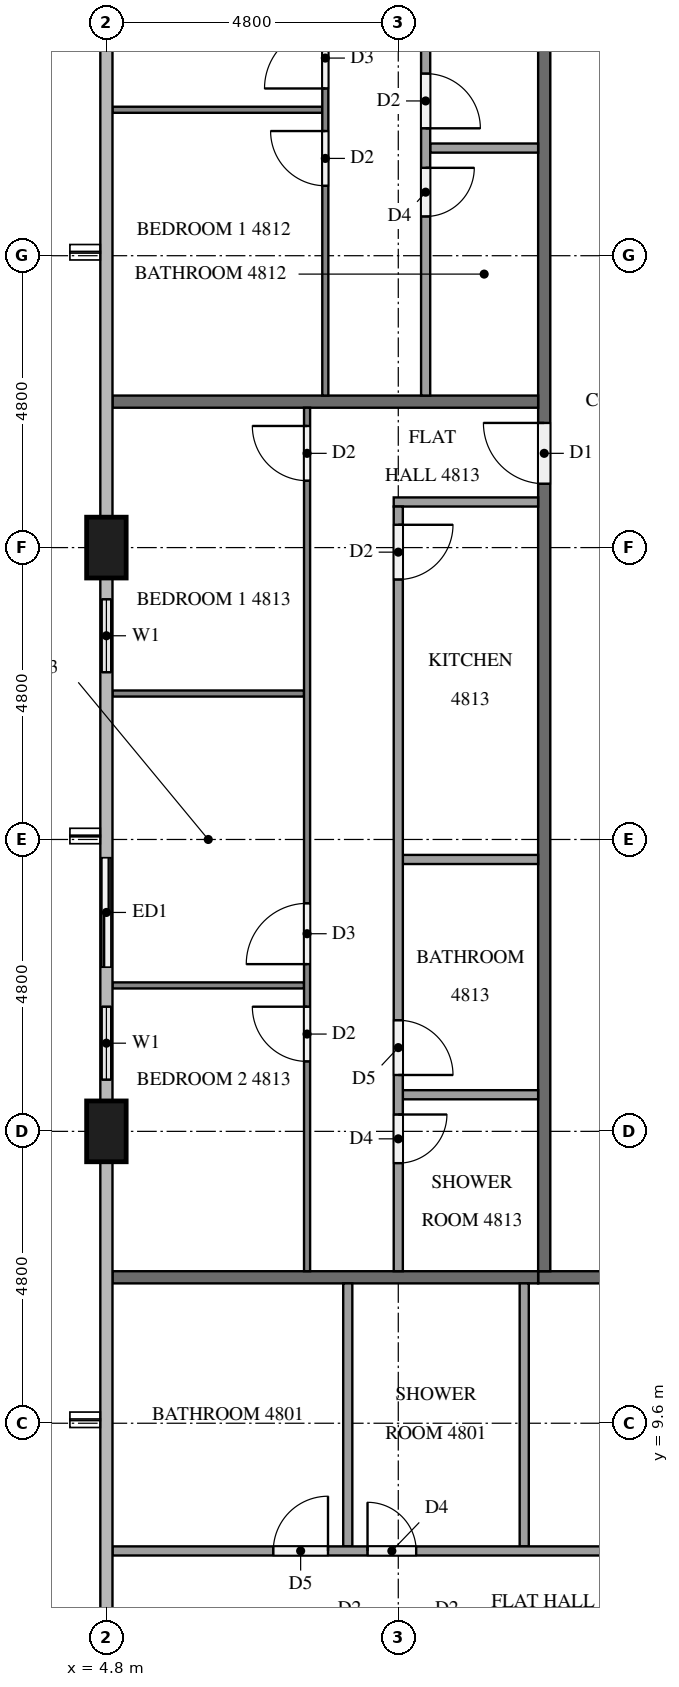
"""IFC4 building model, lengths in metres.
Left out: names, types, materials, properties, quantities, classifications, styles, units other than length and angle.
Written with IfcOpenShell. Run it as: python <this file> out.ifc"""

import sys

from ifc_helpers import new_model, si_unit, direction, frame, frame_2d, origin, origin_2d, place, context, subcontext, project, spatial, rectangle, extrude, element, fill, save


model = new_model("IFC4")
c1 = context("Model", 3, precision=1e-05, world=origin(), true_north=direction((0.0, 1.0)))
c2 = subcontext(c1, "Body", "Model", "MODEL_VIEW")
j1 = project(units=[si_unit("LENGTHUNIT", "METRE"), si_unit("PLANEANGLEUNIT", "RADIAN")], contexts=[c1])
p1 = place(None, origin())
s1 = spatial("IfcSite", under=j1, at=p1, CompositionType="ELEMENT")
p2 = place(p1, origin())
s2 = spatial("IfcBuilding", under=s1, at=p2, CompositionType="ELEMENT")
p3 = place(p2, frame((0.0, 0.0, 185.9)))
s3 = spatial("IfcBuildingStorey", under=s2, at=p3, CompositionType="ELEMENT", Elevation=185.9)
for number, where, z_axis, x_axis in (
    (1, (4.8, 24.0, 0.0), (0.0, 0.0, 1.0), (0.0, 1.0, 0.0)),
    (2, (4.8, 14.4, 0.0), (0.0, 0.0, 1.0), (0.0, 1.0, 0.0)),
):
    element("IfcColumn", number, at=place(p3, frame(where, z_axis=z_axis, x_axis=x_axis)), inside=s3, PredefinedType="COLUMN", context=c2, shape_type="SweptSolid", body=[
        extrude(rectangle(XDim=1.0, YDim=0.65, at=origin_2d()), origin(), (0.0, 0.0, 1.0), 3.2),
    ])
p4 = place(p3, frame((4.8, 23.5, 0.0), z_axis=(0.0, 0.0, 1.0), x_axis=(0.0, -1.0, 0.0)))
e3 = element("IfcWall", 3, at=p4, inside=s3, PredefinedType="SOLIDWALL", context=c2, shape_type="SweptSolid", body=[
    extrude(rectangle(XDim=1.9, YDim=0.15, at=frame_2d((0.95, 0.0))), origin(), (0.0, 0.0, 1.0), 3.2),
])
p5 = place(p4, frame((0.35, 0.0, 0.9)))
e4 = element("IfcOpeningElement", 4, at=p5, cuts=e3, PredefinedType="OPENING", context=c2, shape_type="SweptSolid", body=[
    extrude(rectangle(XDim=1.2, YDim=1.4, at=frame_2d((0.6, 0.7))), frame((0.0, 0.085, 0.0), z_axis=(0.0, -1.0, 0.0), x_axis=(1.0, 0.0, 0.0)), (0.0, 0.0, 1.0), 0.17),
])
p6 = place(p3, frame((4.8, 19.2, 0.0), z_axis=(0.0, 0.0, 1.0), x_axis=(0.0, -1.0, 0.0)))
e5 = element("IfcWall", 5, at=p6, inside=s3, PredefinedType="SOLIDWALL", context=c2, shape_type="SweptSolid", body=[
    extrude(rectangle(XDim=4.3, YDim=0.15, at=frame_2d((2.15, 0.0))), origin(), (0.0, 0.0, 1.0), 3.2),
])
p7 = place(p6, frame((0.3, 0.0, 0.0)))
e6 = element("IfcOpeningElement", 6, at=p7, cuts=e5, PredefinedType="OPENING", context=c2, shape_type="SweptSolid", body=[
    extrude(rectangle(XDim=1.8, YDim=2.4, at=frame_2d((0.9, 1.2))), frame((0.0, 0.085, 0.0), z_axis=(0.0, -1.0, 0.0), x_axis=(1.0, 0.0, 0.0)), (0.0, 0.0, 1.0), 0.17),
])
p8 = place(p6, frame((2.75, 0.0, 0.9)))
e7 = element("IfcOpeningElement", 7, at=p8, cuts=e5, PredefinedType="OPENING", context=c2, shape_type="SweptSolid", body=[
    extrude(rectangle(XDim=1.2, YDim=1.4, at=frame_2d((0.6, 0.7))), frame((0.0, 0.085, 0.0), z_axis=(0.0, -1.0, 0.0), x_axis=(1.0, 0.0, 0.0)), (0.0, 0.0, 1.0), 0.17),
])
p9 = place(p3, frame((50.5, 12.0, 0.0), z_axis=(0.0, 0.0, 1.0), x_axis=(-1.0, 0.0, 0.0)))
e8 = element("IfcWall", 8, at=p9, inside=s3, PredefinedType="PARTITIONING", context=c2, shape_type="SweptSolid", body=[
    extrude(rectangle(XDim=38.6, YDim=0.2, at=frame_2d((19.3, 0.0))), origin(), (0.0, 0.0, 1.0), 3.2),
])
p10 = place(p9, frame((31.65, 0.0, 0.0)))
e9 = element("IfcOpeningElement", 9, at=p10, cuts=e8, PredefinedType="OPENING", context=c2, shape_type="SweptSolid", body=[
    extrude(rectangle(XDim=1.0, YDim=2.1, at=frame_2d((0.5, 1.05))), frame((0.0, 0.11, 0.0), z_axis=(0.0, -1.0, 0.0), x_axis=(1.0, 0.0, 0.0)), (0.0, 0.0, 1.0), 0.22),
])
p11 = place(p9, frame((17.25, 0.0, 0.0)))
e10 = element("IfcOpeningElement", 10, at=p11, cuts=e8, PredefinedType="OPENING", context=c2, shape_type="SweptSolid", body=[
    extrude(rectangle(XDim=1.0, YDim=2.1, at=frame_2d((0.5, 1.05))), frame((0.0, 0.11, 0.0), z_axis=(0.0, -1.0, 0.0), x_axis=(1.0, 0.0, 0.0)), (0.0, 0.0, 1.0), 0.22),
])
p12 = place(p9, frame((7.65, 0.0, 0.0)))
e11 = element("IfcOpeningElement", 11, at=p12, cuts=e8, PredefinedType="OPENING", context=c2, shape_type="SweptSolid", body=[
    extrude(rectangle(XDim=1.0, YDim=2.1, at=frame_2d((0.5, 1.05))), frame((0.0, 0.11, 0.0), z_axis=(0.0, -1.0, 0.0), x_axis=(1.0, 0.0, 0.0)), (0.0, 0.0, 1.0), 0.22),
])
p13 = place(p9, frame((5.9, 0.0, 0.0)))
e12 = element("IfcOpeningElement", 12, at=p13, cuts=e8, PredefinedType="OPENING", context=c2, shape_type="SweptSolid", body=[
    extrude(rectangle(XDim=1.1, YDim=2.1, at=frame_2d((0.55, 1.05))), frame((0.0, 0.11, 0.0), z_axis=(0.0, -1.0, 0.0), x_axis=(1.0, 0.0, 0.0)), (0.0, 0.0, 1.0), 0.22),
])
p14 = place(p3, frame((12.0, 12.1, 0.0), z_axis=(0.0, 0.0, 1.0), x_axis=(0.0, 1.0, 0.0)))
e13 = element("IfcWall", 13, at=p14, inside=s3, PredefinedType="PARTITIONING", context=c2, shape_type="SweptSolid", body=[
    extrude(rectangle(XDim=28.6, YDim=0.2, at=frame_2d((14.3, 0.0))), origin(), (0.0, 0.0, 1.0), 3.2),
])
p15 = place(p14, frame((26.65, 0.0, 0.0)))
e14 = element("IfcOpeningElement", 14, at=p15, cuts=e13, PredefinedType="OPENING", context=c2, shape_type="SweptSolid", body=[
    extrude(rectangle(XDim=1.0, YDim=2.1, at=frame_2d((0.5, 1.05))), frame((0.0, 0.11, 0.0), z_axis=(0.0, -1.0, 0.0), x_axis=(1.0, 0.0, 0.0)), (0.0, 0.0, 1.0), 0.22),
])
p16 = place(p14, frame((24.95, 0.0, 0.0)))
e15 = element("IfcOpeningElement", 15, at=p16, cuts=e13, PredefinedType="OPENING", context=c2, shape_type="SweptSolid", body=[
    extrude(rectangle(XDim=1.0, YDim=2.1, at=frame_2d((0.5, 1.05))), frame((0.0, 0.11, 0.0), z_axis=(0.0, -1.0, 0.0), x_axis=(1.0, 0.0, 0.0)), (0.0, 0.0, 1.0), 0.22),
])
p17 = place(p14, frame((12.95, 0.0, 0.0)))
e16 = element("IfcOpeningElement", 16, at=p17, cuts=e13, PredefinedType="OPENING", context=c2, shape_type="SweptSolid", body=[
    extrude(rectangle(XDim=1.0, YDim=2.1, at=frame_2d((0.5, 1.05))), frame((0.0, 0.11, 0.0), z_axis=(0.0, -1.0, 0.0), x_axis=(1.0, 0.0, 0.0)), (0.0, 0.0, 1.0), 0.22),
])
for number, where, z_axis, x_axis in (
    (17, (4.9, 12.0, 0.0), (0.0, 0.0, 1.0), (1.0, 0.0, 0.0)),
    (18, (4.9, 26.4, 0.0), (0.0, 0.0, 1.0), (1.0, 0.0, 0.0)),
):
    element("IfcWall", number, at=place(p3, frame(where, z_axis=z_axis, x_axis=x_axis)), inside=s3, PredefinedType="PARTITIONING", context=c2, shape_type="SweptSolid", body=[
        extrude(rectangle(XDim=7.0, YDim=0.2, at=frame_2d((3.5, 0.0))), origin(), (0.0, 0.0, 1.0), 3.2),
    ])
for number, where, z_axis, x_axis in (
    (19, (11.671, 11.9, 0.0), (0.0, 0.0, 1.0), (0.0, -1.0, 0.0)),
    (20, (8.769, 11.9, 0.0), (0.0, 0.0, 1.0), (0.0, -1.0, 0.0)),
):
    element("IfcWall", number, at=place(p3, frame(where, z_axis=z_axis, x_axis=x_axis)), inside=s3, PredefinedType="PARTITIONING", context=c2, shape_type="SweptSolid", body=[
        extrude(rectangle(XDim=4.325, YDim=0.15, at=frame_2d((2.163, 0.0))), origin(), (0.0, 0.0, 1.0), 3.2),
    ])
p18 = place(p3, frame((4.9, 7.5, 0.0), z_axis=(0.0, 0.0, 1.0), x_axis=(1.0, 0.0, 0.0)))
e21 = element("IfcWall", 21, at=p18, inside=s3, PredefinedType="PARTITIONING", context=c2, shape_type="SweptSolid", body=[
    extrude(rectangle(XDim=12.575, YDim=0.15, at=frame_2d((6.288, 0.0))), origin(), (0.0, 0.0, 1.0), 3.2),
])
p19 = place(p18, frame((11.375, 0.0, 0.0)))
e22 = element("IfcOpeningElement", 22, at=p19, cuts=e21, PredefinedType="OPENING", context=c2, shape_type="SweptSolid", body=[
    extrude(rectangle(XDim=0.9, YDim=2.1, at=frame_2d((0.45, 1.05))), frame((0.0, 0.085, 0.0), z_axis=(0.0, -1.0, 0.0), x_axis=(1.0, 0.0, 0.0)), (0.0, 0.0, 1.0), 0.17),
])
p20 = place(p18, frame((4.194, 0.0, 0.0)))
e23 = element("IfcOpeningElement", 23, at=p20, cuts=e21, PredefinedType="OPENING", context=c2, shape_type="SweptSolid", body=[
    extrude(rectangle(XDim=0.8, YDim=2.1, at=frame_2d((0.4, 1.05))), frame((0.0, 0.085, 0.0), z_axis=(0.0, -1.0, 0.0), x_axis=(1.0, 0.0, 0.0)), (0.0, 0.0, 1.0), 0.17),
])
p21 = place(p18, frame((2.644, 0.0, 0.0)))
e24 = element("IfcOpeningElement", 24, at=p21, cuts=e21, PredefinedType="OPENING", context=c2, shape_type="SweptSolid", body=[
    extrude(rectangle(XDim=0.9, YDim=2.1, at=frame_2d((0.45, 1.05))), frame((0.0, 0.085, 0.0), z_axis=(0.0, -1.0, 0.0), x_axis=(1.0, 0.0, 0.0)), (0.0, 0.0, 1.0), 0.17),
])
p22 = place(p3, frame((8.35, 31.2, 0.0), z_axis=(0.0, 0.0, 1.0), x_axis=(-1.0, 0.0, 0.0)))
e25 = element("IfcWall", 25, at=p22, inside=s3, PredefinedType="PARTITIONING", context=c2, shape_type="SweptSolid", body=[
    extrude(rectangle(XDim=3.45, YDim=0.1, at=frame_2d((1.725, 0.0))), origin(), (0.0, 0.0, 1.0), 3.2),
])
p23 = place(p3, frame((8.4, 26.5, 0.0), z_axis=(0.0, 0.0, 1.0), x_axis=(0.0, 1.0, 0.0)))
e26 = element("IfcWall", 26, at=p23, inside=s3, PredefinedType="PARTITIONING", context=c2, shape_type="SweptSolid", body=[
    extrude(rectangle(XDim=11.8, YDim=0.1, at=frame_2d((5.9, 0.0))), origin(), (0.0, 0.0, 1.0), 3.2),
])
p24 = place(p23, frame((5.05, 0.0, 0.0)))
e27 = element("IfcOpeningElement", 27, at=p24, cuts=e26, PredefinedType="OPENING", context=c2, shape_type="SweptSolid", body=[
    extrude(rectangle(XDim=1.0, YDim=2.1, at=frame_2d((0.5, 1.05))), frame((0.0, 0.06, 0.0), z_axis=(0.0, -1.0, 0.0), x_axis=(1.0, 0.0, 0.0)), (0.0, 0.0, 1.0), 0.12),
])
p25 = place(p23, frame((3.45, 0.0, 0.0)))
e28 = element("IfcOpeningElement", 28, at=p25, cuts=e26, PredefinedType="OPENING", context=c2, shape_type="SweptSolid", body=[
    extrude(rectangle(XDim=0.9, YDim=2.1, at=frame_2d((0.45, 1.05))), frame((0.0, 0.06, 0.0), z_axis=(0.0, -1.0, 0.0), x_axis=(1.0, 0.0, 0.0)), (0.0, 0.0, 1.0), 0.12),
])
p26 = place(p3, frame((11.9, 30.57, 0.0), z_axis=(0.0, 0.0, 1.0), x_axis=(-1.0, 0.0, 0.0)))
e29 = element("IfcWall", 29, at=p26, inside=s3, PredefinedType="PARTITIONING", context=c2, shape_type="SweptSolid", body=[
    extrude(rectangle(XDim=1.775, YDim=0.15, at=frame_2d((0.887, 0.0))), origin(), (0.0, 0.0, 1.0), 3.2),
])
p27 = place(p3, frame((10.05, 36.675, 0.0), z_axis=(0.0, 0.0, 1.0), x_axis=(0.0, -1.0, 0.0)))
e30 = element("IfcWall", 30, at=p27, inside=s3, PredefinedType="PARTITIONING", context=c2, shape_type="SweptSolid", body=[
    extrude(rectangle(XDim=10.175, YDim=0.15, at=frame_2d((5.087, 0.0))), origin(), (0.0, 0.0, 1.0), 3.2),
])
p28 = place(p27, frame((4.88, 0.0, 0.0)))
e31 = element("IfcOpeningElement", 31, at=p28, cuts=e30, PredefinedType="OPENING", context=c2, shape_type="SweptSolid", body=[
    extrude(rectangle(XDim=0.9, YDim=2.1, at=frame_2d((0.45, 1.05))), frame((0.0, 0.085, 0.0), z_axis=(0.0, -1.0, 0.0), x_axis=(1.0, 0.0, 0.0)), (0.0, 0.0, 1.0), 0.17),
])
p29 = place(p27, frame((6.43, 0.0, 0.0)))
e32 = element("IfcOpeningElement", 32, at=p29, cuts=e30, PredefinedType="OPENING", context=c2, shape_type="SweptSolid", body=[
    extrude(rectangle(XDim=0.8, YDim=2.1, at=frame_2d((0.4, 1.05))), frame((0.0, 0.085, 0.0), z_axis=(0.0, -1.0, 0.0), x_axis=(1.0, 0.0, 0.0)), (0.0, 0.0, 1.0), 0.17),
])
for number, where, z_axis, x_axis in (
    (33, (8.05, 21.6, 0.0), (0.0, 0.0, 1.0), (-1.0, 0.0, 0.0)),
    (34, (8.05, 16.8, 0.0), (0.0, 0.0, 1.0), (-1.0, 0.0, 0.0)),
):
    element("IfcWall", number, at=place(p3, frame(where, z_axis=z_axis, x_axis=x_axis)), inside=s3, PredefinedType="PARTITIONING", context=c2, shape_type="SweptSolid", body=[
        extrude(rectangle(XDim=3.15, YDim=0.1, at=frame_2d((1.575, 0.0))), origin(), (0.0, 0.0, 1.0), 3.2),
    ])
p30 = place(p3, frame((8.1, 12.1, 0.0), z_axis=(0.0, 0.0, 1.0), x_axis=(0.0, 1.0, 0.0)))
e35 = element("IfcWall", 35, at=p30, inside=s3, PredefinedType="PARTITIONING", context=c2, shape_type="SweptSolid", body=[
    extrude(rectangle(XDim=14.2, YDim=0.1, at=frame_2d((7.1, 0.0))), origin(), (0.0, 0.0, 1.0), 3.2),
])
p31 = place(p30, frame((13.0, 0.0, 0.0)))
e36 = element("IfcOpeningElement", 36, at=p31, cuts=e35, PredefinedType="OPENING", context=c2, shape_type="SweptSolid", body=[
    extrude(rectangle(XDim=0.9, YDim=2.1, at=frame_2d((0.45, 1.05))), frame((0.0, 0.06, 0.0), z_axis=(0.0, -1.0, 0.0), x_axis=(1.0, 0.0, 0.0)), (0.0, 0.0, 1.0), 0.12),
])
p32 = place(p30, frame((5.05, 0.0, 0.0)))
e37 = element("IfcOpeningElement", 37, at=p32, cuts=e35, PredefinedType="OPENING", context=c2, shape_type="SweptSolid", body=[
    extrude(rectangle(XDim=1.0, YDim=2.1, at=frame_2d((0.5, 1.05))), frame((0.0, 0.06, 0.0), z_axis=(0.0, -1.0, 0.0), x_axis=(1.0, 0.0, 0.0)), (0.0, 0.0, 1.0), 0.12),
])
p33 = place(p30, frame((3.45, 0.0, 0.0)))
e38 = element("IfcOpeningElement", 38, at=p33, cuts=e35, PredefinedType="OPENING", context=c2, shape_type="SweptSolid", body=[
    extrude(rectangle(XDim=0.9, YDim=2.1, at=frame_2d((0.45, 1.05))), frame((0.0, 0.06, 0.0), z_axis=(0.0, -1.0, 0.0), x_axis=(1.0, 0.0, 0.0)), (0.0, 0.0, 1.0), 0.12),
])
for number, where, z_axis, x_axis in (
    (39, (11.9, 18.871, 0.0), (0.0, 0.0, 1.0), (-1.0, 0.0, 0.0)),
    (40, (11.9, 15.002, 0.0), (0.0, 0.0, 1.0), (-1.0, 0.0, 0.0)),
):
    element("IfcWall", number, at=place(p3, frame(where, z_axis=z_axis, x_axis=x_axis)), inside=s3, PredefinedType="PARTITIONING", context=c2, shape_type="SweptSolid", body=[
        extrude(rectangle(XDim=2.225, YDim=0.15, at=frame_2d((1.112, 0.0))), origin(), (0.0, 0.0, 1.0), 3.2),
    ])
p34 = place(p3, frame((11.9, 24.75, 0.0), z_axis=(0.0, 0.0, 1.0), x_axis=(-1.0, 0.0, 0.0)))
e41 = element("IfcWall", 41, at=p34, inside=s3, PredefinedType="PARTITIONING", context=c2, shape_type="SweptSolid", body=[
    extrude(rectangle(XDim=2.375, YDim=0.15, at=frame_2d((1.188, 0.0))), origin(), (0.0, 0.0, 1.0), 3.2),
])
p35 = place(p3, frame((9.6, 24.675, 0.0), z_axis=(0.0, 0.0, 1.0), x_axis=(0.0, -1.0, 0.0)))
e42 = element("IfcWall", 42, at=p35, inside=s3, PredefinedType="PARTITIONING", context=c2, shape_type="SweptSolid", body=[
    extrude(rectangle(XDim=12.575, YDim=0.15, at=frame_2d((6.288, 0.0))), origin(), (0.0, 0.0, 1.0), 3.2),
])
p36 = place(p35, frame((0.3, 0.0, 0.0)))
e43 = element("IfcOpeningElement", 43, at=p36, cuts=e42, PredefinedType="OPENING", context=c2, shape_type="SweptSolid", body=[
    extrude(rectangle(XDim=0.9, YDim=2.1, at=frame_2d((0.45, 1.05))), frame((0.0, 0.085, 0.0), z_axis=(0.0, -1.0, 0.0), x_axis=(1.0, 0.0, 0.0)), (0.0, 0.0, 1.0), 0.17),
])
p37 = place(p35, frame((8.448, 0.0, 0.0)))
e44 = element("IfcOpeningElement", 44, at=p37, cuts=e42, PredefinedType="OPENING", context=c2, shape_type="SweptSolid", body=[
    extrude(rectangle(XDim=0.9, YDim=2.1, at=frame_2d((0.45, 1.05))), frame((0.0, 0.085, 0.0), z_axis=(0.0, -1.0, 0.0), x_axis=(1.0, 0.0, 0.0)), (0.0, 0.0, 1.0), 0.17),
])
p38 = place(p35, frame((9.998, 0.0, 0.0)))
e45 = element("IfcOpeningElement", 45, at=p38, cuts=e42, PredefinedType="OPENING", context=c2, shape_type="SweptSolid", body=[
    extrude(rectangle(XDim=0.8, YDim=2.1, at=frame_2d((0.4, 1.05))), frame((0.0, 0.085, 0.0), z_axis=(0.0, -1.0, 0.0), x_axis=(1.0, 0.0, 0.0)), (0.0, 0.0, 1.0), 0.17),
])
p39 = place(p5, origin())
e46 = element("IfcWindow", 46, at=p39, inside=s3, PartitioningType="SINGLE_PANEL", PredefinedType="WINDOW", context=c2, shape_type="SweptSolid", body=[
    extrude(rectangle(XDim=1.2, YDim=1.4, at=frame_2d((0.6, 0.7))), frame((0.0, 0.03, 0.0), z_axis=(0.0, -1.0, 0.0), x_axis=(1.0, 0.0, 0.0)), (0.0, 0.0, 1.0), 0.06),
])
fill(e4, e46)
p40 = place(p7, origin())
e47 = element("IfcDoor", 47, at=p40, inside=s3, OperationType="SLIDING_TO_LEFT", PredefinedType="DOOR", context=c2, shape_type="SweptSolid", body=[
    extrude(rectangle(XDim=1.8, YDim=2.4, at=frame_2d((0.9, 1.2))), frame((0.0, 0.025, 0.0), z_axis=(0.0, -1.0, 0.0), x_axis=(1.0, 0.0, 0.0)), (0.0, 0.0, 1.0), 0.05),
])
fill(e6, e47)
p41 = place(p8, origin())
e48 = element("IfcWindow", 48, at=p41, inside=s3, PartitioningType="SINGLE_PANEL", PredefinedType="WINDOW", context=c2, shape_type="SweptSolid", body=[
    extrude(rectangle(XDim=1.2, YDim=1.4, at=frame_2d((0.6, 0.7))), frame((0.0, 0.03, 0.0), z_axis=(0.0, -1.0, 0.0), x_axis=(1.0, 0.0, 0.0)), (0.0, 0.0, 1.0), 0.06),
])
fill(e7, e48)
p42 = place(p17, origin())
e49 = element("IfcDoor", 49, at=p42, inside=s3, OperationType="SINGLE_SWING_RIGHT", PredefinedType="DOOR", context=c2, shape_type="SweptSolid", body=[
    extrude(rectangle(XDim=1.0, YDim=2.1, at=frame_2d((0.5, 1.05))), frame((0.0, 0.025, 0.0), z_axis=(0.0, -1.0, 0.0), x_axis=(1.0, 0.0, 0.0)), (0.0, 0.0, 1.0), 0.05),
])
fill(e16, e49)
p43 = place(p20, origin())
e50 = element("IfcDoor", 50, at=p43, inside=s3, OperationType="SINGLE_SWING_LEFT", PredefinedType="DOOR", context=c2, shape_type="SweptSolid", body=[
    extrude(rectangle(XDim=0.8, YDim=2.1, at=frame_2d((0.4, 1.05))), frame((0.0, 0.025, 0.0), z_axis=(0.0, -1.0, 0.0), x_axis=(1.0, 0.0, 0.0)), (0.0, 0.0, 1.0), 0.05),
])
fill(e23, e50)
p44 = place(p21, origin())
e51 = element("IfcDoor", 51, at=p44, inside=s3, OperationType="SINGLE_SWING_RIGHT", PredefinedType="DOOR", context=c2, shape_type="SweptSolid", body=[
    extrude(rectangle(XDim=0.9, YDim=2.1, at=frame_2d((0.45, 1.05))), frame((0.0, 0.025, 0.0), z_axis=(0.0, -1.0, 0.0), x_axis=(1.0, 0.0, 0.0)), (0.0, 0.0, 1.0), 0.05),
])
fill(e24, e51)
p45 = place(p24, origin())
e52 = element("IfcDoor", 52, at=p45, inside=s3, OperationType="SINGLE_SWING_LEFT", PredefinedType="DOOR", context=c2, shape_type="SweptSolid", body=[
    extrude(rectangle(XDim=1.0, YDim=2.1, at=frame_2d((0.5, 1.05))), frame((0.0, 0.025, 0.0), z_axis=(0.0, -1.0, 0.0), x_axis=(1.0, 0.0, 0.0)), (0.0, 0.0, 1.0), 0.05),
])
fill(e27, e52)
p46 = place(p25, origin())
e53 = element("IfcDoor", 53, at=p46, inside=s3, OperationType="SINGLE_SWING_RIGHT", PredefinedType="DOOR", context=c2, shape_type="SweptSolid", body=[
    extrude(rectangle(XDim=0.9, YDim=2.1, at=frame_2d((0.45, 1.05))), frame((0.0, 0.025, 0.0), z_axis=(0.0, -1.0, 0.0), x_axis=(1.0, 0.0, 0.0)), (0.0, 0.0, 1.0), 0.05),
])
fill(e28, e53)
p47 = place(p28, origin())
e54 = element("IfcDoor", 54, at=p47, inside=s3, OperationType="SINGLE_SWING_RIGHT", PredefinedType="DOOR", context=c2, shape_type="SweptSolid", body=[
    extrude(rectangle(XDim=0.9, YDim=2.1, at=frame_2d((0.45, 1.05))), frame((0.0, 0.025, 0.0), z_axis=(0.0, -1.0, 0.0), x_axis=(1.0, 0.0, 0.0)), (0.0, 0.0, 1.0), 0.05),
])
fill(e31, e54)
p48 = place(p29, origin())
e55 = element("IfcDoor", 55, at=p48, inside=s3, OperationType="SINGLE_SWING_LEFT", PredefinedType="DOOR", context=c2, shape_type="SweptSolid", body=[
    extrude(rectangle(XDim=0.8, YDim=2.1, at=frame_2d((0.4, 1.05))), frame((0.0, 0.025, 0.0), z_axis=(0.0, -1.0, 0.0), x_axis=(1.0, 0.0, 0.0)), (0.0, 0.0, 1.0), 0.05),
])
fill(e32, e55)
p49 = place(p31, origin())
e56 = element("IfcDoor", 56, at=p49, inside=s3, OperationType="SINGLE_SWING_RIGHT", PredefinedType="DOOR", context=c2, shape_type="SweptSolid", body=[
    extrude(rectangle(XDim=0.9, YDim=2.1, at=frame_2d((0.45, 1.05))), frame((0.0, 0.025, 0.0), z_axis=(0.0, -1.0, 0.0), x_axis=(1.0, 0.0, 0.0)), (0.0, 0.0, 1.0), 0.05),
])
fill(e36, e56)
p50 = place(p32, origin())
e57 = element("IfcDoor", 57, at=p50, inside=s3, OperationType="SINGLE_SWING_LEFT", PredefinedType="DOOR", context=c2, shape_type="SweptSolid", body=[
    extrude(rectangle(XDim=1.0, YDim=2.1, at=frame_2d((0.5, 1.05))), frame((0.0, 0.025, 0.0), z_axis=(0.0, -1.0, 0.0), x_axis=(1.0, 0.0, 0.0)), (0.0, 0.0, 1.0), 0.05),
])
fill(e37, e57)
p51 = place(p33, origin())
e58 = element("IfcDoor", 58, at=p51, inside=s3, OperationType="SINGLE_SWING_RIGHT", PredefinedType="DOOR", context=c2, shape_type="SweptSolid", body=[
    extrude(rectangle(XDim=0.9, YDim=2.1, at=frame_2d((0.45, 1.05))), frame((0.0, 0.025, 0.0), z_axis=(0.0, -1.0, 0.0), x_axis=(1.0, 0.0, 0.0)), (0.0, 0.0, 1.0), 0.05),
])
fill(e38, e58)
p52 = place(p36, origin())
e59 = element("IfcDoor", 59, at=p52, inside=s3, OperationType="SINGLE_SWING_LEFT", PredefinedType="DOOR", context=c2, shape_type="SweptSolid", body=[
    extrude(rectangle(XDim=0.9, YDim=2.1, at=frame_2d((0.45, 1.05))), frame((0.0, 0.025, 0.0), z_axis=(0.0, -1.0, 0.0), x_axis=(1.0, 0.0, 0.0)), (0.0, 0.0, 1.0), 0.05),
])
fill(e43, e59)
p53 = place(p37, origin())
e60 = element("IfcDoor", 60, at=p53, inside=s3, OperationType="SINGLE_SWING_RIGHT", PredefinedType="DOOR", context=c2, shape_type="SweptSolid", body=[
    extrude(rectangle(XDim=0.9, YDim=2.1, at=frame_2d((0.45, 1.05))), frame((0.0, 0.025, 0.0), z_axis=(0.0, -1.0, 0.0), x_axis=(1.0, 0.0, 0.0)), (0.0, 0.0, 1.0), 0.05),
])
fill(e44, e60)
p54 = place(p38, origin())
e61 = element("IfcDoor", 61, at=p54, inside=s3, OperationType="SINGLE_SWING_LEFT", PredefinedType="DOOR", context=c2, shape_type="SweptSolid", body=[
    extrude(rectangle(XDim=0.8, YDim=2.1, at=frame_2d((0.4, 1.05))), frame((0.0, 0.025, 0.0), z_axis=(0.0, -1.0, 0.0), x_axis=(1.0, 0.0, 0.0)), (0.0, 0.0, 1.0), 0.05),
])
fill(e45, e61)
save(model, sys.argv[1])
